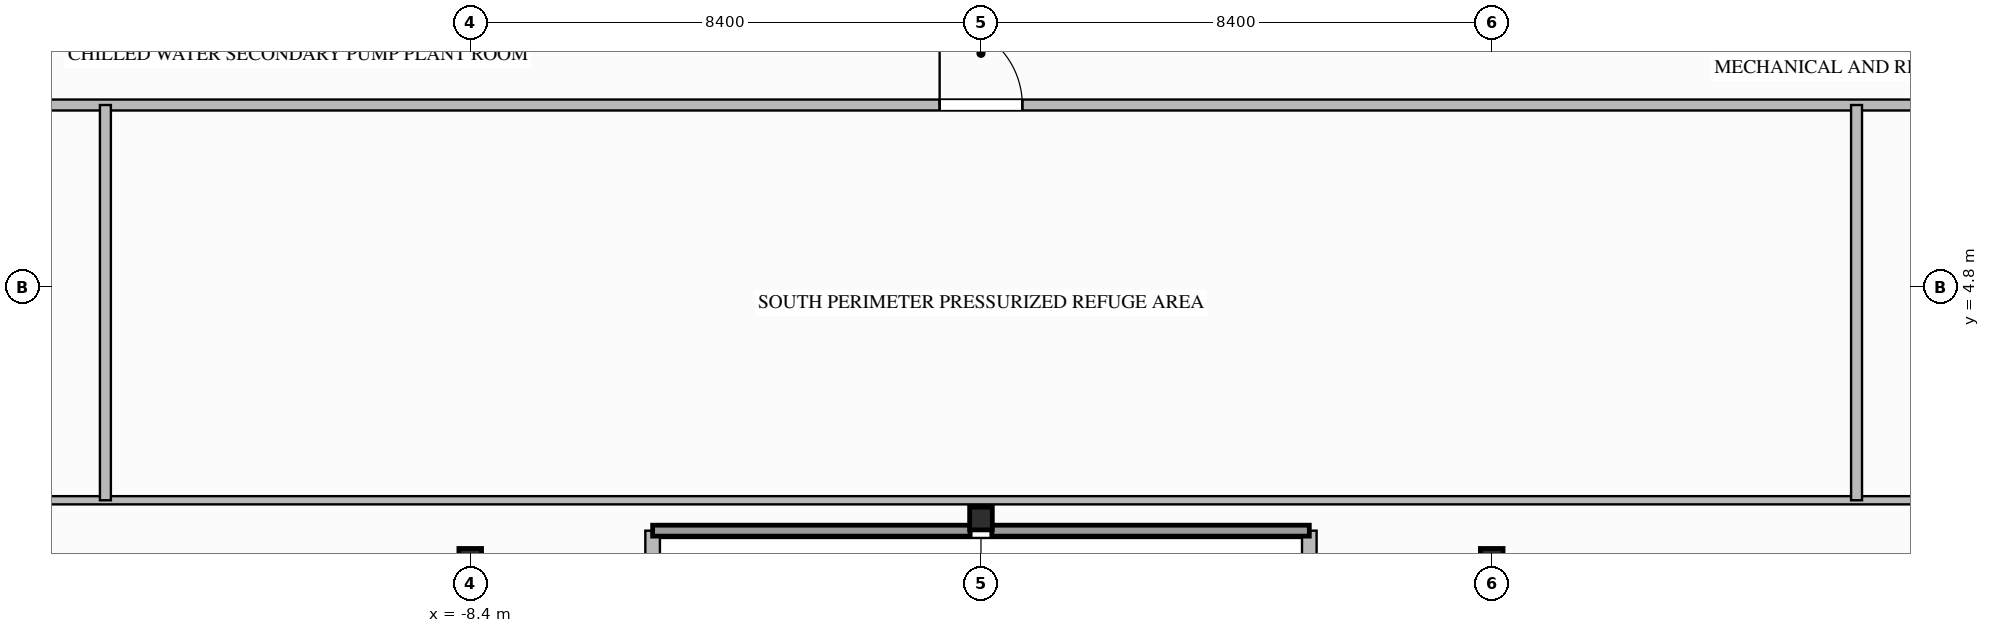
"""IFC4 building model, lengths in metres.
Left out: names, types, materials, properties, quantities, classifications, styles, units other than length and angle.
Written with IfcOpenShell. Run it as: python <this file> out.ifc"""

import sys

from ifc_helpers import new_model, si_unit, direction, frame, frame_2d, origin, origin_2d, place, context, subcontext, project, spatial, rectangle, i_section, extrude, element, fill, save


model = new_model("IFC4")
c1 = context("Model", 3, precision=1e-05, world=origin(), true_north=direction((0.0, 1.0)))
c2 = subcontext(c1, "Body", "Model", "MODEL_VIEW")
j1 = project(units=[si_unit("LENGTHUNIT", "METRE"), si_unit("PLANEANGLEUNIT", "RADIAN")], contexts=[c1])
p1 = place(None, origin())
s1 = spatial("IfcSite", under=j1, at=p1, CompositionType="ELEMENT")
p2 = place(p1, origin())
s2 = spatial("IfcBuilding", under=s1, at=p2, CompositionType="ELEMENT")
p3 = place(p2, frame((0.0, 0.0, 260.0)))
s3 = spatial("IfcBuildingStorey", under=s2, at=p3, CompositionType="ELEMENT", Elevation=260.0)
for number, where, z_axis, x_axis in (
    (1, (-8.4, 0.32, 0.0), (0.0, 0.0, 1.0), (0.0, 1.0, 0.0)),
    (2, (0.0, 1.0, 0.0), (0.0, 0.0, 1.0), (0.0, 1.0, 0.0)),
    (3, (8.4, 0.32, 0.0), (0.0, 0.0, 1.0), (0.0, 1.0, 0.0)),
):
    element("IfcColumn", number, at=place(p3, frame(where, z_axis=z_axis, x_axis=x_axis)), inside=s3, PredefinedType="COLUMN", context=c2, shape_type="SweptSolid", body=[
        extrude(i_section(OverallWidth=0.374, OverallDepth=0.372, WebThickness=0.016, FlangeThickness=0.026, FilletRadius=0.025, at=origin_2d()), origin(), (0.0, 0.0, 1.0), 4.997),
    ])
for number, where, z_axis, x_axis in (
    (4, (5.4, 0.12, 0.0), (0.0, 0.0, 1.0), (0.0, 1.0, 0.0)),
    (5, (-5.4, 0.8, 0.0), (0.0, 0.0, 1.0), (0.0, -1.0, 0.0)),
):
    element("IfcWall", number, at=place(p3, frame(where, z_axis=z_axis, x_axis=x_axis)), inside=s3, PredefinedType="STANDARD", context=c2, shape_type="SweptSolid", body=[
        extrude(rectangle(XDim=0.68, YDim=0.24, at=frame_2d((0.34, 0.0))), origin(), (0.0, 0.0, 1.0), 4.74),
    ])
p4 = place(p3, frame((-16.58, 1.3, 0.0), z_axis=(0.0, 0.0, 1.0), x_axis=(1.0, 0.0, 0.0)))
e6 = element("IfcWall", 6, at=p4, inside=s3, PredefinedType="PARTITIONING", context=c2, shape_type="SweptSolid", body=[
    extrude(rectangle(XDim=33.16, YDim=0.135, at=frame_2d((16.58, 0.0))), origin(), (0.0, 0.0, 1.0), 4.74),
])
p5 = place(p3, frame((-19.35, 7.8, 0.0), z_axis=(0.0, 0.0, 1.0), x_axis=(1.0, 0.0, 0.0)))
e7 = element("IfcWall", 7, at=p5, inside=s3, PredefinedType="SOLIDWALL", context=c2, shape_type="SweptSolid", body=[
    extrude(rectangle(XDim=38.7, YDim=0.18, at=frame_2d((19.35, 0.0))), origin(), (0.0, 0.0, 1.0), 4.74),
])
p6 = place(p5, frame((18.67, 0.0, 0.0)))
e8 = element("IfcOpeningElement", 8, at=p6, cuts=e7, PredefinedType="OPENING", context=c2, shape_type="SweptSolid", body=[
    extrude(rectangle(XDim=1.36, YDim=2.2, at=frame_2d((0.68, 1.1))), frame((0.0, 0.1, 0.0), z_axis=(0.0, -1.0, 0.0), x_axis=(1.0, 0.0, 0.0)), (0.0, 0.0, 1.0), 0.2),
])
for number, where, z_axis, x_axis in (
    (9, (-14.4, 1.3, 0.0), (0.0, 0.0, 1.0), (0.0, 1.0, 0.0)),
    (10, (14.4, 1.3, 0.0), (0.0, 0.0, 1.0), (0.0, 1.0, 0.0)),
):
    element("IfcWall", number, at=place(p3, frame(where, z_axis=z_axis, x_axis=x_axis)), inside=s3, PredefinedType="SOLIDWALL", context=c2, shape_type="SweptSolid", body=[
        extrude(rectangle(XDim=6.5, YDim=0.18, at=frame_2d((3.25, 0.0))), origin(), (0.0, 0.0, 1.0), 4.74),
    ])
p7 = place(p6, origin())
e11 = element("IfcDoor", 11, at=p7, inside=s3, OperationType="SINGLE_SWING_LEFT", PredefinedType="DOOR", context=c2, shape_type="SweptSolid", body=[
    extrude(rectangle(XDim=1.36, YDim=2.2, at=frame_2d((0.68, 1.1))), frame((0.0, 0.025, 0.0), z_axis=(0.0, -1.0, 0.0), x_axis=(1.0, 0.0, 0.0)), (0.0, 0.0, 1.0), 0.05),
])
fill(e8, e11)
save(model, sys.argv[1])
